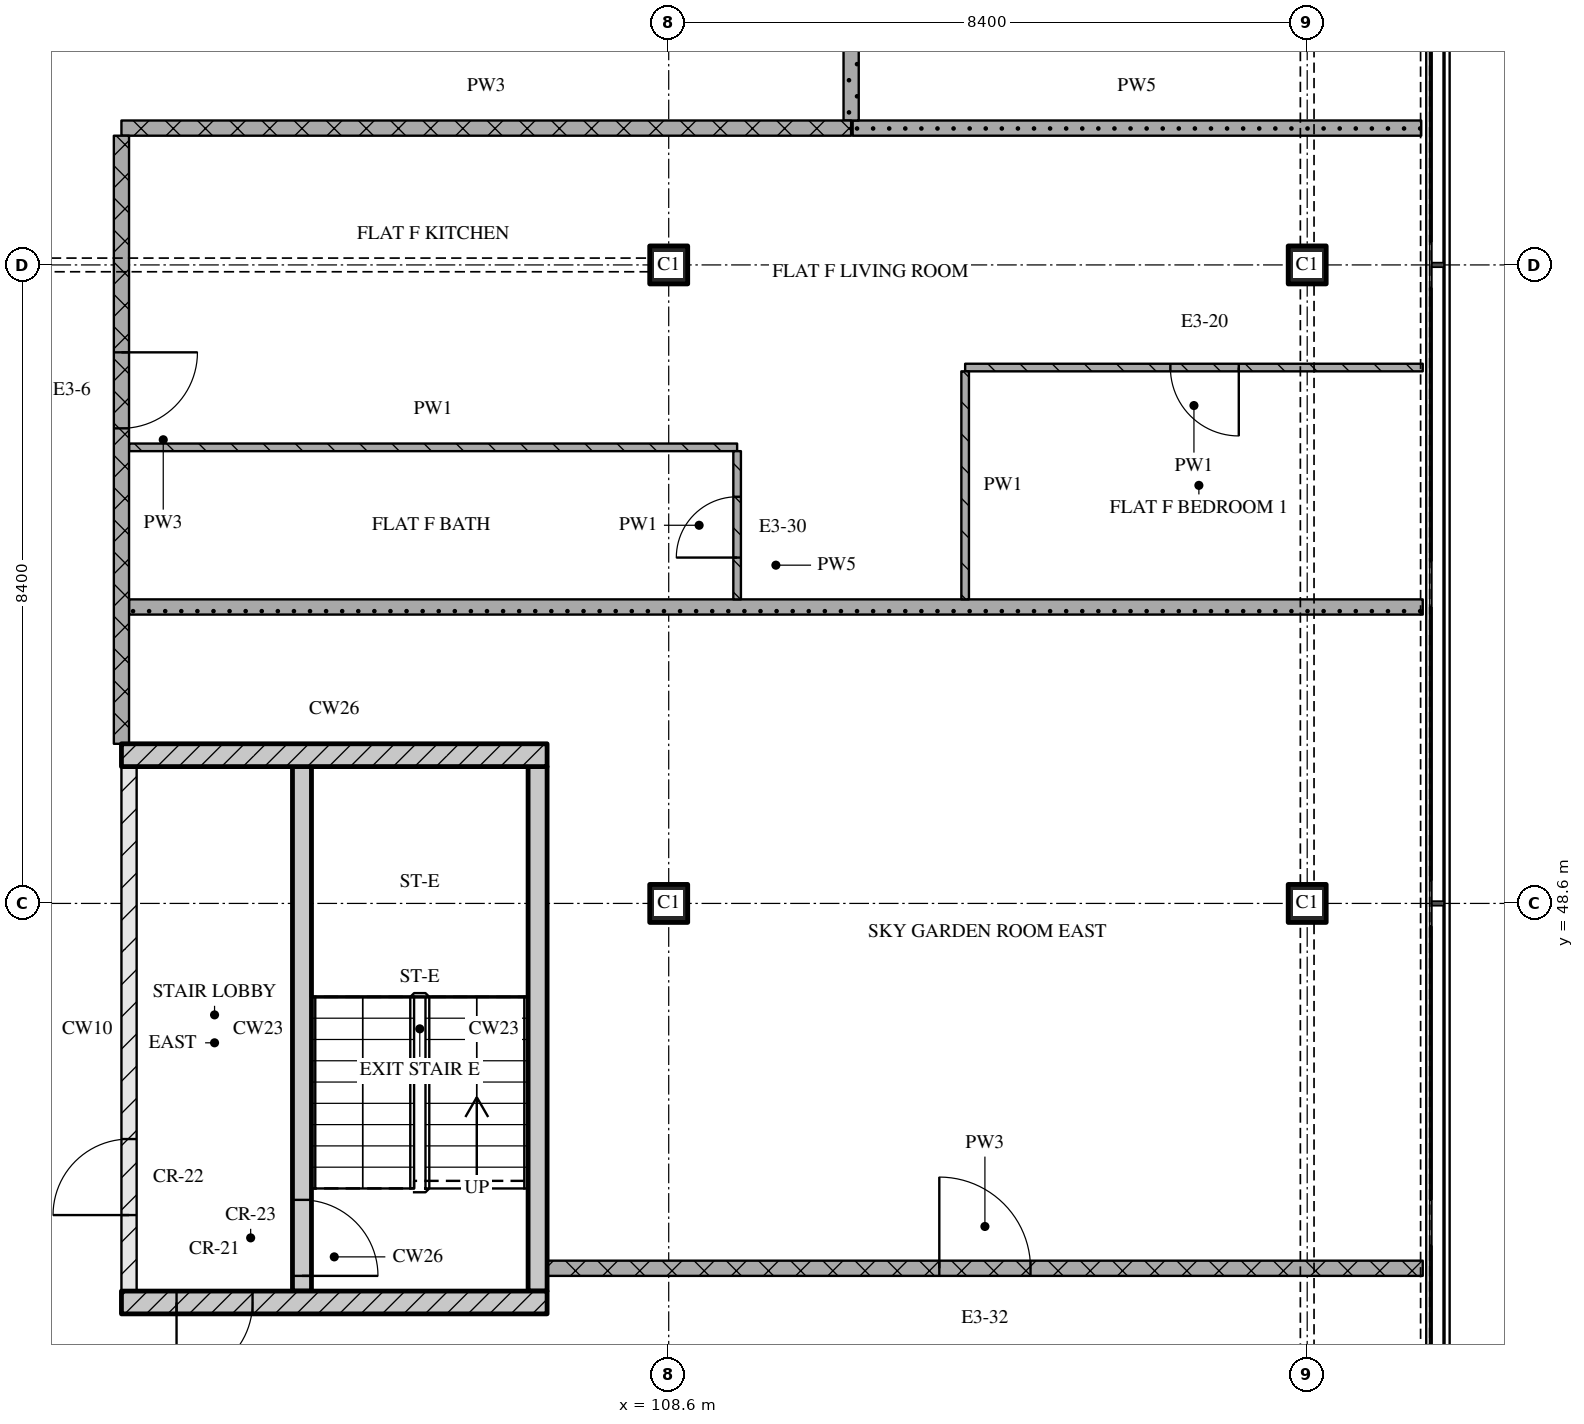
"""IFC4 building model, lengths in metres.
Left out: names, types, materials, properties, quantities, classifications, styles, units other than length and angle.
Written with IfcOpenShell. Run it as: python <this file> out.ifc"""

import sys

from ifc_helpers import new_model, si_unit, direction, frame, frame_2d, origin, origin_2d, place, context, subcontext, project, spatial, rectangle, extrude, element, fill, save


model = new_model("IFC4")
c1 = context("Model", 3, precision=1e-05, world=origin(), true_north=direction((0.0, 1.0)))
c2 = subcontext(c1, "Body", "Model", "MODEL_VIEW")
j1 = project(units=[si_unit("LENGTHUNIT", "METRE"), si_unit("PLANEANGLEUNIT", "RADIAN")], contexts=[c1])
p1 = place(None, origin())
s1 = spatial("IfcSite", under=j1, at=p1, CompositionType="ELEMENT")
p2 = place(p1, origin())
s2 = spatial("IfcBuilding", under=s1, at=p2, CompositionType="ELEMENT")
p3 = place(p2, frame((0.0, 0.0, 277.95)))
s3 = spatial("IfcBuildingStorey", under=s2, at=p3, CompositionType="ELEMENT", Elevation=277.95)
for number, where, z_axis, x_axis in (
    (1, (108.6, 48.6, 0.0), (0.0, 0.0, 1.0), (1.0, 0.0, 0.0)),
    (2, (108.6, 57.0, 0.0), (0.0, 0.0, 1.0), (1.0, 0.0, 0.0)),
    (3, (117.0, 48.6, 0.0), (0.0, 0.0, 1.0), (1.0, 0.0, 0.0)),
    (4, (117.0, 57.0, 0.0), (0.0, 0.0, 1.0), (1.0, 0.0, 0.0)),
):
    element("IfcColumn", number, at=place(p3, frame(where, z_axis=z_axis, x_axis=x_axis)), inside=s3, PredefinedType="COLUMN", context=c2, shape_type="SweptSolid", body=[
        extrude(rectangle(XDim=0.5, YDim=0.5, at=origin_2d()), origin(), (0.0, 0.0, 1.0), 3.6),
    ])
p4 = place(p3, frame((101.4, 43.35, 0.0), z_axis=(0.0, 0.0, 1.0), x_axis=(1.0, 0.0, 0.0)))
e5 = element("IfcWall", 5, at=p4, inside=s3, PredefinedType="SOLIDWALL", context=c2, shape_type="SweptSolid", body=[
    extrude(rectangle(XDim=5.6, YDim=0.3, at=frame_2d((2.8, 0.0))), origin(), (0.0, 0.0, 1.0), 3.32),
])
p5 = place(p4, frame((0.725, 0.0, 0.0)))
e6 = element("IfcOpeningElement", 6, at=p5, cuts=e5, PredefinedType="OPENING", context=c2, shape_type="SweptSolid", body=[
    extrude(rectangle(XDim=1.0, YDim=2.1, at=frame_2d((0.5, 1.05))), frame((0.0, 0.16, 0.0), z_axis=(0.0, -1.0, 0.0), x_axis=(1.0, 0.0, 0.0)), (0.0, 0.0, 1.0), 0.32),
])
p6 = place(p3, frame((101.5, 43.5, 0.0), z_axis=(0.0, 0.0, 1.0), x_axis=(0.0, 1.0, 0.0)))
e7 = element("IfcWall", 7, at=p6, inside=s3, PredefinedType="PARTITIONING", context=c2, shape_type="SweptSolid", body=[
    extrude(rectangle(XDim=6.9, YDim=0.2, at=frame_2d((3.45, 0.0))), origin(), (0.0, 0.0, 1.0), 3.32),
])
p7 = place(p6, frame((1.0, 0.0, 0.0)))
e8 = element("IfcOpeningElement", 8, at=p7, cuts=e7, PredefinedType="OPENING", context=c2, shape_type="SweptSolid", body=[
    extrude(rectangle(XDim=1.0, YDim=2.1, at=frame_2d((0.5, 1.05))), frame((0.0, 0.11, 0.0), z_axis=(0.0, -1.0, 0.0), x_axis=(1.0, 0.0, 0.0)), (0.0, 0.0, 1.0), 0.22),
])
p8 = place(p3, frame((103.775, 43.5, 0.0), z_axis=(0.0, 0.0, 1.0), x_axis=(0.0, 1.0, 0.0)))
e9 = element("IfcWall", 9, at=p8, inside=s3, PredefinedType="SOLIDWALL", context=c2, shape_type="SweptSolid", body=[
    extrude(rectangle(XDim=6.9, YDim=0.25, at=frame_2d((3.45, 0.0))), origin(), (0.0, 0.0, 1.0), 3.32),
])
p9 = place(p8, frame((0.2, 0.0, 0.0)))
e10 = element("IfcOpeningElement", 10, at=p9, cuts=e9, PredefinedType="OPENING", context=c2, shape_type="SweptSolid", body=[
    extrude(rectangle(XDim=1.0, YDim=2.1, at=frame_2d((0.5, 1.05))), frame((0.0, 0.135, 0.0), z_axis=(0.0, -1.0, 0.0), x_axis=(1.0, 0.0, 0.0)), (0.0, 0.0, 1.0), 0.27),
])
p10 = place(p3, frame((106.875, 43.5, 0.0), z_axis=(0.0, 0.0, 1.0), x_axis=(0.0, 1.0, 0.0)))
e11 = element("IfcWall", 11, at=p10, inside=s3, PredefinedType="SOLIDWALL", context=c2, shape_type="SweptSolid", body=[
    extrude(rectangle(XDim=6.9, YDim=0.25, at=frame_2d((3.45, 0.0))), origin(), (0.0, 0.0, 1.0), 3.32),
])
p11 = place(p3, frame((101.4, 50.55, 0.0), z_axis=(0.0, 0.0, 1.0), x_axis=(1.0, 0.0, 0.0)))
e12 = element("IfcWall", 12, at=p11, inside=s3, PredefinedType="SOLIDWALL", context=c2, shape_type="SweptSolid", body=[
    extrude(rectangle(XDim=5.6, YDim=0.3, at=frame_2d((2.8, 0.0))), origin(), (0.0, 0.0, 1.0), 3.32),
])
p12 = place(p3, frame((107.0, 43.8, 0.0), z_axis=(0.0, 0.0, 1.0), x_axis=(1.0, 0.0, 0.0)))
e13 = element("IfcWall", 13, at=p12, inside=s3, PredefinedType="PARTITIONING", context=c2, shape_type="SweptSolid", body=[
    extrude(rectangle(XDim=11.52, YDim=0.2, at=frame_2d((5.76, 0.0))), origin(), (0.0, 0.0, 1.0), 3.32),
])
p13 = place(p12, frame((5.16, 0.0, 0.0)))
e14 = element("IfcOpeningElement", 14, at=p13, cuts=e13, PredefinedType="OPENING", context=c2, shape_type="SweptSolid", body=[
    extrude(rectangle(XDim=1.2, YDim=2.1, at=frame_2d((0.6, 1.05))), frame((0.0, 0.11, 0.0), z_axis=(0.0, -1.0, 0.0), x_axis=(1.0, 0.0, 0.0)), (0.0, 0.0, 1.0), 0.22),
])
p14 = place(p3, frame((101.5, 52.5, 0.0), z_axis=(0.0, 0.0, 1.0), x_axis=(1.0, 0.0, 0.0)))
e15 = element("IfcWall", 15, at=p14, inside=s3, PredefinedType="PARTITIONING", context=c2, shape_type="SweptSolid", body=[
    extrude(rectangle(XDim=17.02, YDim=0.2, at=frame_2d((8.51, 0.0))), origin(), (0.0, 0.0, 1.0), 3.32),
])
p15 = place(p3, frame((101.5, 54.6, 0.0), z_axis=(0.0, 0.0, 1.0), x_axis=(1.0, 0.0, 0.0)))
e16 = element("IfcWall", 16, at=p15, inside=s3, PredefinedType="PARTITIONING", context=c2, shape_type="SweptSolid", body=[
    extrude(rectangle(XDim=8.0, YDim=0.1, at=frame_2d((4.0, 0.0))), origin(), (0.0, 0.0, 1.0), 3.32),
])
p16 = place(p3, frame((118.52, 55.65, 0.0), z_axis=(0.0, 0.0, 1.0), x_axis=(-1.0, 0.0, 0.0)))
e17 = element("IfcWall", 17, at=p16, inside=s3, PredefinedType="PARTITIONING", context=c2, shape_type="SweptSolid", body=[
    extrude(rectangle(XDim=6.02, YDim=0.1, at=frame_2d((3.01, 0.0))), origin(), (0.0, 0.0, 1.0), 3.32),
])
p17 = place(p16, frame((2.42, 0.0, 0.0)))
e18 = element("IfcOpeningElement", 18, at=p17, cuts=e17, PredefinedType="OPENING", context=c2, shape_type="SweptSolid", body=[
    extrude(rectangle(XDim=0.9, YDim=2.1, at=frame_2d((0.45, 1.05))), frame((0.0, 0.06, 0.0), z_axis=(0.0, -1.0, 0.0), x_axis=(1.0, 0.0, 0.0)), (0.0, 0.0, 1.0), 0.12),
])
p18 = place(p3, frame((101.4, 58.8, 0.0), z_axis=(0.0, 0.0, 1.0), x_axis=(1.0, 0.0, 0.0)))
e19 = element("IfcWall", 19, at=p18, inside=s3, PredefinedType="PARTITIONING", context=c2, shape_type="SweptSolid", body=[
    extrude(rectangle(XDim=9.6, YDim=0.2, at=frame_2d((4.8, 0.0))), origin(), (0.0, 0.0, 1.0), 3.32),
])
p19 = place(p3, frame((111.02, 58.8, 0.0), z_axis=(0.0, 0.0, 1.0), x_axis=(1.0, 0.0, 0.0)))
e20 = element("IfcWall", 20, at=p19, inside=s3, PredefinedType="PARTITIONING", context=c2, shape_type="SweptSolid", body=[
    extrude(rectangle(XDim=7.48, YDim=0.2, at=frame_2d((3.74, 0.0))), origin(), (0.0, 0.0, 1.0), 3.32),
])
p20 = place(p3, frame((101.4, 58.7, 0.0), z_axis=(0.0, 0.0, 1.0), x_axis=(0.0, -1.0, 0.0)))
e21 = element("IfcWall", 21, at=p20, inside=s3, PredefinedType="PARTITIONING", context=c2, shape_type="SweptSolid", body=[
    extrude(rectangle(XDim=8.0, YDim=0.2, at=frame_2d((4.0, 0.0))), origin(), (0.0, 0.0, 1.0), 3.32),
])
p21 = place(p20, frame((2.85, 0.0, 0.0)))
e22 = element("IfcOpeningElement", 22, at=p21, cuts=e21, PredefinedType="OPENING", context=c2, shape_type="SweptSolid", body=[
    extrude(rectangle(XDim=1.0, YDim=2.1, at=frame_2d((0.5, 1.05))), frame((0.0, 0.11, 0.0), z_axis=(0.0, -1.0, 0.0), x_axis=(1.0, 0.0, 0.0)), (0.0, 0.0, 1.0), 0.22),
])
p22 = place(p3, frame((109.5, 52.6, 0.0), z_axis=(0.0, 0.0, 1.0), x_axis=(0.0, 1.0, 0.0)))
e23 = element("IfcWall", 23, at=p22, inside=s3, PredefinedType="PARTITIONING", context=c2, shape_type="SweptSolid", body=[
    extrude(rectangle(XDim=1.95, YDim=0.1, at=frame_2d((0.975, 0.0))), origin(), (0.0, 0.0, 1.0), 3.32),
])
p23 = place(p22, frame((0.55, 0.0, 0.0)))
e24 = element("IfcOpeningElement", 24, at=p23, cuts=e23, PredefinedType="OPENING", context=c2, shape_type="SweptSolid", body=[
    extrude(rectangle(XDim=0.8, YDim=2.1, at=frame_2d((0.4, 1.05))), frame((0.0, 0.06, 0.0), z_axis=(0.0, -1.0, 0.0), x_axis=(1.0, 0.0, 0.0)), (0.0, 0.0, 1.0), 0.12),
])
p24 = place(p3, frame((111.0, 61.1, 0.0), z_axis=(0.0, 0.0, 1.0), x_axis=(0.0, -1.0, 0.0)))
e25 = element("IfcWall", 25, at=p24, inside=s3, PredefinedType="PARTITIONING", context=c2, shape_type="SweptSolid", body=[
    extrude(rectangle(XDim=2.2, YDim=0.2, at=frame_2d((1.1, 0.0))), origin(), (0.0, 0.0, 1.0), 3.32),
])
p25 = place(p3, frame((112.5, 55.6, 0.0), z_axis=(0.0, 0.0, 1.0), x_axis=(0.0, -1.0, 0.0)))
e26 = element("IfcWall", 26, at=p25, inside=s3, PredefinedType="PARTITIONING", context=c2, shape_type="SweptSolid", body=[
    extrude(rectangle(XDim=3.0, YDim=0.1, at=frame_2d((1.5, 0.0))), origin(), (0.0, 0.0, 1.0), 3.32),
])
p26 = place(p5, origin())
e27 = element("IfcDoor", 27, at=p26, inside=s3, OperationType="SINGLE_SWING_RIGHT", PredefinedType="DOOR", context=c2, shape_type="SweptSolid", body=[
    extrude(rectangle(XDim=1.0, YDim=2.1, at=frame_2d((0.5, 1.05))), frame((0.0, 0.025, 0.0), z_axis=(0.0, -1.0, 0.0), x_axis=(1.0, 0.0, 0.0)), (0.0, 0.0, 1.0), 0.05),
])
fill(e6, e27)
p27 = place(p9, origin())
e28 = element("IfcDoor", 28, at=p27, inside=s3, OperationType="SINGLE_SWING_RIGHT", PredefinedType="DOOR", context=c2, shape_type="SweptSolid", body=[
    extrude(rectangle(XDim=1.0, YDim=2.1, at=frame_2d((0.5, 1.05))), frame((0.0, 0.025, 0.0), z_axis=(0.0, -1.0, 0.0), x_axis=(1.0, 0.0, 0.0)), (0.0, 0.0, 1.0), 0.05),
])
fill(e10, e28)
p28 = place(p7, origin())
e29 = element("IfcDoor", 29, at=p28, inside=s3, OperationType="SINGLE_SWING_LEFT", PredefinedType="DOOR", context=c2, shape_type="SweptSolid", body=[
    extrude(rectangle(XDim=1.0, YDim=2.1, at=frame_2d((0.5, 1.05))), frame((0.0, 0.025, 0.0), z_axis=(0.0, -1.0, 0.0), x_axis=(1.0, 0.0, 0.0)), (0.0, 0.0, 1.0), 0.05),
])
fill(e8, e29)
p29 = place(p13, origin())
e30 = element("IfcDoor", 30, at=p29, inside=s3, OperationType="SINGLE_SWING_LEFT", PredefinedType="DOOR", context=c2, shape_type="SweptSolid", body=[
    extrude(rectangle(XDim=1.2, YDim=2.1, at=frame_2d((0.6, 1.05))), frame((0.0, 0.025, 0.0), z_axis=(0.0, -1.0, 0.0), x_axis=(1.0, 0.0, 0.0)), (0.0, 0.0, 1.0), 0.05),
])
fill(e14, e30)
p30 = place(p17, origin())
e31 = element("IfcDoor", 31, at=p30, inside=s3, OperationType="SINGLE_SWING_LEFT", PredefinedType="DOOR", context=c2, shape_type="SweptSolid", body=[
    extrude(rectangle(XDim=0.9, YDim=2.1, at=frame_2d((0.45, 1.05))), frame((0.0, 0.025, 0.0), z_axis=(0.0, -1.0, 0.0), x_axis=(1.0, 0.0, 0.0)), (0.0, 0.0, 1.0), 0.05),
])
fill(e18, e31)
p31 = place(p21, origin())
e32 = element("IfcDoor", 32, at=p31, inside=s3, OperationType="SINGLE_SWING_LEFT", PredefinedType="DOOR", context=c2, shape_type="SweptSolid", body=[
    extrude(rectangle(XDim=1.0, YDim=2.1, at=frame_2d((0.5, 1.05))), frame((0.0, 0.025, 0.0), z_axis=(0.0, -1.0, 0.0), x_axis=(1.0, 0.0, 0.0)), (0.0, 0.0, 1.0), 0.05),
])
fill(e22, e32)
p32 = place(p23, origin())
e33 = element("IfcDoor", 33, at=p32, inside=s3, OperationType="SINGLE_SWING_LEFT", PredefinedType="DOOR", context=c2, shape_type="SweptSolid", body=[
    extrude(rectangle(XDim=0.8, YDim=2.1, at=frame_2d((0.4, 1.05))), frame((0.0, 0.025, 0.0), z_axis=(0.0, -1.0, 0.0), x_axis=(1.0, 0.0, 0.0)), (0.0, 0.0, 1.0), 0.05),
])
fill(e24, e33)
save(model, sys.argv[1])
